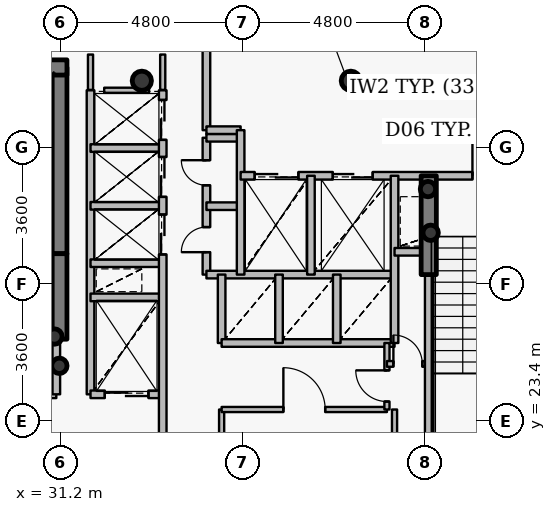
"""IFC4 building model, lengths in metres.
Left out: names, types, materials, properties, quantities, classifications, styles, units other than length and angle.
Written with IfcOpenShell. Run it as: python <this file> out.ifc"""

import sys

from ifc_helpers import new_model, si_unit, direction, frame, frame_2d, origin, origin_2d, place, context, subcontext, project, spatial, rectangle, hollow_circle, extrude, source, transform, mapped, element, fill, save


model = new_model("IFC4")
c1 = context("Model", 3, precision=1e-05, world=origin(), true_north=direction((0.0, 1.0)))
c2 = subcontext(c1, "Body", "Model", "MODEL_VIEW")
j1 = project(units=[si_unit("LENGTHUNIT", "METRE"), si_unit("PLANEANGLEUNIT", "RADIAN")], contexts=[c1])
p1 = place(None, origin())
s1 = spatial("IfcSite", under=j1, at=p1, CompositionType="ELEMENT")
p2 = place(p1, origin())
s2 = spatial("IfcBuilding", under=s1, at=p2, CompositionType="ELEMENT")
p3 = place(p2, frame((0.0, 0.0, 217.8)))
s3 = spatial("IfcBuildingStorey", under=s2, at=p3, CompositionType="ELEMENT", Elevation=217.8)
for number, where, z_axis, x_axis in (
    (1, (38.85, 32.35, 0.0), (0.0, 0.0, 1.0), (1.0, 0.0, 0.0)),
    (2, (33.35, 32.35, 0.0), (0.0, 0.0, 1.0), (1.0, 0.0, 0.0)),
):
    element("IfcColumn", number, at=place(p3, frame(where, z_axis=z_axis, x_axis=x_axis)), inside=s3, PredefinedType="COLUMN", context=c2, shape_type="SweptSolid", body=[
        extrude(hollow_circle(Radius=0.254, WallThickness=0.02, at=origin_2d()), origin(), (0.0, 0.0, 1.0), 3.75),
    ])
p4 = place(p3, frame((31.18, 27.8, 0.0), z_axis=(0.0, 0.0, 1.0), x_axis=(0.0, 1.0, 0.0)))
e3 = element("IfcWall", 3, at=p4, inside=s3, PredefinedType="SHEAR", context=c2, shape_type="SweptSolid", body=[
    extrude(rectangle(XDim=4.9, YDim=0.4, at=frame_2d((2.45, 0.0))), origin(), (0.0, 0.0, 1.0), 3.75),
])
p5 = place(p3, frame((27.28, 32.7, 0.0), z_axis=(0.0, 0.0, 1.0), x_axis=(1.0, 0.0, 0.0)))
e4 = element("IfcWall", 4, at=p5, inside=s3, PredefinedType="SHEAR", context=c2, shape_type="SweptSolid", body=[
    extrude(rectangle(XDim=4.1, YDim=0.4, at=frame_2d((2.05, 0.0))), origin(), (0.0, 0.0, 1.0), 3.75),
])
for number, where, z_axis, x_axis in (
    (5, (31.05, 25.62, 0.0), (0.0, 0.0, 1.0), (1.0, 0.0, 0.0)),
    (6, (31.18, 24.85, 0.0), (0.0, 0.0, 1.0), (1.0, 0.0, 0.0)),
    (7, (40.95, 28.35, 0.0), (0.0, 0.0, 1.0), (1.0, 0.0, 0.0)),
    (8, (40.88, 29.5, 0.0), (0.0, 0.0, 1.0), (1.0, 0.0, 0.0)),
):
    element("IfcColumn", number, at=place(p3, frame(where, z_axis=z_axis, x_axis=x_axis)), inside=s3, PredefinedType="COLUMN", context=c2, shape_type="SweptSolid", body=[
        extrude(hollow_circle(Radius=0.203, WallThickness=0.016, at=origin_2d()), origin(), (0.0, 0.0, 1.0), 3.75),
    ])
p6 = place(p3, frame((31.18, 25.55, 0.0), z_axis=(0.0, 0.0, 1.0), x_axis=(0.0, 1.0, 0.0)))
e9 = element("IfcWall", 9, at=p6, inside=s3, PredefinedType="SHEAR", context=c2, shape_type="SweptSolid", body=[
    extrude(rectangle(XDim=2.25, YDim=0.4, at=frame_2d((1.125, 0.0))), origin(), (0.0, 0.0, 1.0), 3.1),
])
p7 = place(p3, frame((40.9, 27.25, 0.0), z_axis=(0.0, 0.0, 1.0), x_axis=(0.0, 1.0, 0.0)))
e10 = element("IfcWall", 10, at=p7, inside=s3, PredefinedType="SHEAR", context=c2, shape_type="SweptSolid", body=[
    extrude(rectangle(XDim=2.6, YDim=0.4, at=frame_2d((1.3, 0.0))), origin(), (0.0, 0.0, 1.0), 3.1),
])
p8 = place(p3, frame((27.56, 24.1, 0.0), z_axis=(0.0, 0.0, 1.0), x_axis=(1.0, 0.0, 0.0)))
e11 = element("IfcWall", 11, at=p8, inside=s3, PredefinedType="PARTITIONING", context=c2, shape_type="SweptSolid", body=[
    extrude(rectangle(XDim=3.54, YDim=0.2, at=frame_2d((1.77, 0.0))), origin(), (0.0, 0.0, 1.0), 3.5),
])
p9 = place(p8, frame((1.17, 0.0, 0.0)))
e12 = element("IfcOpeningElement", 12, at=p9, cuts=e11, PredefinedType="OPENING", context=c2, shape_type="SweptSolid", body=[
    extrude(rectangle(XDim=1.2, YDim=2.15, at=origin_2d()), frame((0.6, 0.11, 1.075), z_axis=(0.0, -1.0, 0.0), x_axis=(1.0, 0.0, 0.0)), (0.0, 0.0, 1.0), 0.22),
])
p10 = place(p3, frame((31.1, 24.1, 0.0), z_axis=(0.0, 0.0, 1.0), x_axis=(0.0, 1.0, 0.0)))
e13 = element("IfcWall", 13, at=p10, inside=s3, PredefinedType="PARTITIONING", context=c2, shape_type="SweptSolid", body=[
    extrude(rectangle(XDim=1.44, YDim=0.2, at=frame_2d((0.72, 0.0))), origin(), (0.0, 0.0, 1.0), 3.5),
])
p11 = place(p3, frame((32.0, 24.1, 0.0), z_axis=(0.0, 0.0, 1.0), x_axis=(0.0, 1.0, 0.0)))
e14 = element("IfcWall", 14, at=p11, inside=s3, PredefinedType="PARTITIONING", context=c2, shape_type="SweptSolid", body=[
    extrude(rectangle(XDim=8.0, YDim=0.2, at=frame_2d((4.0, 0.0))), origin(), (0.0, 0.0, 1.0), 3.5),
])
p12 = place(p3, frame((32.0, 24.1, 0.0), z_axis=(0.0, 0.0, 1.0), x_axis=(1.0, 0.0, 0.0)))
e15 = element("IfcWall", 15, at=p12, inside=s3, PredefinedType="PARTITIONING", context=c2, shape_type="SweptSolid", body=[
    extrude(rectangle(XDim=1.9, YDim=0.2, at=frame_2d((0.95, 0.0))), origin(), (0.0, 0.0, 1.0), 3.085),
])
p13 = place(p12, frame((0.375, 0.0, 0.0)))
e16 = element("IfcOpeningElement", 16, at=p13, cuts=e15, PredefinedType="OPENING", context=c2, shape_type="SweptSolid", body=[
    extrude(rectangle(XDim=1.15, YDim=2.15, at=origin_2d()), frame((0.575, 0.11, 1.075), z_axis=(0.0, -1.0, 0.0), x_axis=(1.0, 0.0, 0.0)), (0.0, 0.0, 1.0), 0.22),
])
for number, where, z_axis, x_axis in (
    (17, (32.0, 26.65, 0.0), (0.0, 0.0, 1.0), (1.0, 0.0, 0.0)),
    (18, (32.0, 27.55, 0.0), (0.0, 0.0, 1.0), (1.0, 0.0, 0.0)),
    (19, (32.0, 29.06, 0.0), (0.0, 0.0, 1.0), (1.0, 0.0, 0.0)),
    (20, (32.0, 30.58, 0.0), (0.0, 0.0, 1.0), (1.0, 0.0, 0.0)),
):
    element("IfcWall", number, at=place(p3, frame(where, z_axis=z_axis, x_axis=x_axis)), inside=s3, PredefinedType="PARTITIONING", context=c2, shape_type="SweptSolid", body=[
        extrude(rectangle(XDim=1.9, YDim=0.2, at=frame_2d((0.95, 0.0))), origin(), (0.0, 0.0, 1.0), 3.085),
    ])
p14 = place(p3, frame((33.9, 20.7, 0.0), z_axis=(0.0, 0.0, 1.0), x_axis=(0.0, 1.0, 0.0)))
e21 = element("IfcWall", 21, at=p14, inside=s3, PredefinedType="PARTITIONING", context=c2, shape_type="SweptSolid", body=[
    extrude(rectangle(XDim=11.4, YDim=0.2, at=frame_2d((5.7, 0.0))), origin(), (0.0, 0.0, 1.0), 3.085),
])
p15 = place(p14, frame((7.08, 0.0, 0.0)))
e22 = element("IfcOpeningElement", 22, at=p15, cuts=e21, PredefinedType="OPENING", context=c2, shape_type="SweptSolid", body=[
    extrude(rectangle(XDim=1.05, YDim=2.15, at=origin_2d()), frame((0.525, 0.11, 1.075), z_axis=(0.0, -1.0, 0.0), x_axis=(1.0, 0.0, 0.0)), (0.0, 0.0, 1.0), 0.22),
])
p16 = place(p14, frame((8.595, 0.0, 0.0)))
e23 = element("IfcOpeningElement", 23, at=p16, cuts=e21, PredefinedType="OPENING", context=c2, shape_type="SweptSolid", body=[
    extrude(rectangle(XDim=1.05, YDim=2.15, at=origin_2d()), frame((0.525, 0.11, 1.075), z_axis=(0.0, -1.0, 0.0), x_axis=(1.0, 0.0, 0.0)), (0.0, 0.0, 1.0), 0.22),
])
p17 = place(p14, frame((10.095, 0.0, 0.0)))
e24 = element("IfcOpeningElement", 24, at=p17, cuts=e21, PredefinedType="OPENING", context=c2, shape_type="SweptSolid", body=[
    extrude(rectangle(XDim=1.05, YDim=2.15, at=origin_2d()), frame((0.525, 0.11, 1.075), z_axis=(0.0, -1.0, 0.0), x_axis=(1.0, 0.0, 0.0)), (0.0, 0.0, 1.0), 0.22),
])
p18 = place(p3, frame((35.05, 27.25, 0.0), z_axis=(0.0, 0.0, 1.0), x_axis=(0.0, 1.0, 0.0)))
e25 = element("IfcWall", 25, at=p18, inside=s3, PredefinedType="PARTITIONING", context=c2, shape_type="SweptSolid", body=[
    extrude(rectangle(XDim=3.6, YDim=0.2, at=frame_2d((1.8, 0.0))), origin(), (0.0, 0.0, 1.0), 3.5),
])
p19 = place(p18, frame((0.59, 0.0, 0.0)))
e26 = element("IfcOpeningElement", 26, at=p19, cuts=e25, PredefinedType="OPENING", context=c2, shape_type="SweptSolid", body=[
    extrude(rectangle(XDim=0.66, YDim=2.05, at=origin_2d()), frame((0.33, 0.11, 1.025), z_axis=(0.0, -1.0, 0.0), x_axis=(1.0, 0.0, 0.0)), (0.0, 0.0, 1.0), 0.22),
])
p20 = place(p18, frame((2.35, 0.0, 0.0)))
e27 = element("IfcOpeningElement", 27, at=p20, cuts=e25, PredefinedType="OPENING", context=c2, shape_type="SweptSolid", body=[
    extrude(rectangle(XDim=0.66, YDim=2.05, at=origin_2d()), frame((0.33, 0.11, 1.025), z_axis=(0.0, -1.0, 0.0), x_axis=(1.0, 0.0, 0.0)), (0.0, 0.0, 1.0), 0.22),
])
p21 = place(p3, frame((35.05, 27.25, 0.0), z_axis=(0.0, 0.0, 1.0), x_axis=(1.0, 0.0, 0.0)))
e28 = element("IfcWall", 28, at=p21, inside=s3, PredefinedType="PARTITIONING", context=c2, shape_type="SweptSolid", body=[
    extrude(rectangle(XDim=4.95, YDim=0.2, at=frame_2d((2.475, 0.0))), origin(), (0.0, 0.0, 1.0), 3.085),
])
for number, where, z_axis, x_axis in (
    (29, (35.05, 29.05, 0.0), (0.0, 0.0, 1.0), (1.0, 0.0, 0.0)),
    (30, (35.05, 30.85, 0.0), (0.0, 0.0, 1.0), (1.0, 0.0, 0.0)),
):
    element("IfcWall", number, at=place(p3, frame(where, z_axis=z_axis, x_axis=x_axis)), inside=s3, PredefinedType="PARTITIONING", context=c2, shape_type="SweptSolid", body=[
        extrude(rectangle(XDim=0.9, YDim=0.2, at=frame_2d((0.45, 0.0))), origin(), (0.0, 0.0, 1.0), 3.5),
    ])
p22 = place(p3, frame((35.05, 31.05, 0.0), z_axis=(0.0, 0.0, 1.0), x_axis=(0.0, 1.0, 0.0)))
e31 = element("IfcWall", 31, at=p22, inside=s3, PredefinedType="PARTITIONING", context=c2, shape_type="SweptSolid", body=[
    extrude(rectangle(XDim=2.25, YDim=0.2, at=frame_2d((1.125, 0.0))), origin(), (0.0, 0.0, 1.0), 3.085),
])
p23 = place(p3, frame((35.05, 31.05, 0.0), z_axis=(0.0, 0.0, 1.0), x_axis=(1.0, 0.0, 0.0)))
e32 = element("IfcWall", 32, at=p23, inside=s3, PredefinedType="PARTITIONING", context=c2, shape_type="SweptSolid", body=[
    extrude(rectangle(XDim=0.9, YDim=0.2, at=frame_2d((0.45, 0.0))), origin(), (0.0, 0.0, 1.0), 3.5),
])
p24 = place(p3, frame((35.45, 20.7, 0.0), z_axis=(0.0, 0.0, 1.0), x_axis=(0.0, 1.0, 0.0)))
e33 = element("IfcWall", 33, at=p24, inside=s3, PredefinedType="PARTITIONING", context=c2, shape_type="SweptSolid", body=[
    extrude(rectangle(XDim=3.0, YDim=0.135, at=frame_2d((1.5, 0.0))), origin(), (0.0, 0.0, 1.0), 3.085),
])
p25 = place(p3, frame((35.45, 23.7, 0.0), z_axis=(0.0, 0.0, 1.0), x_axis=(1.0, 0.0, 0.0)))
e34 = element("IfcWall", 34, at=p25, inside=s3, PredefinedType="PARTITIONING", context=c2, shape_type="SweptSolid", body=[
    extrude(rectangle(XDim=4.35, YDim=0.135, at=frame_2d((2.175, 0.0))), origin(), (0.0, 0.0, 1.0), 3.085),
])
p26 = place(p25, frame((1.625, 0.0, 0.0)))
e35 = element("IfcOpeningElement", 35, at=p26, cuts=e34, PredefinedType="OPENING", context=c2, shape_type="SweptSolid", body=[
    extrude(rectangle(XDim=1.1, YDim=2.15, at=origin_2d()), frame((0.55, 0.078, 1.075), z_axis=(0.0, -1.0, 0.0), x_axis=(1.0, 0.0, 0.0)), (0.0, 0.0, 1.0), 0.155),
])
p27 = place(p3, frame((35.45, 25.45, 0.0), z_axis=(0.0, 0.0, 1.0), x_axis=(0.0, 1.0, 0.0)))
e36 = element("IfcWall", 36, at=p27, inside=s3, PredefinedType="PARTITIONING", context=c2, shape_type="SweptSolid", body=[
    extrude(rectangle(XDim=1.8, YDim=0.2, at=frame_2d((0.9, 0.0))), origin(), (0.0, 0.0, 1.0), 3.5),
])
p28 = place(p3, frame((35.45, 25.45, 0.0), z_axis=(0.0, 0.0, 1.0), x_axis=(1.0, 0.0, 0.0)))
e37 = element("IfcWall", 37, at=p28, inside=s3, PredefinedType="PARTITIONING", context=c2, shape_type="SweptSolid", body=[
    extrude(rectangle(XDim=4.55, YDim=0.2, at=frame_2d((2.275, 0.0))), origin(), (0.0, 0.0, 1.0), 3.085),
])
p29 = place(p3, frame((35.95, 27.25, 0.0), z_axis=(0.0, 0.0, 1.0), x_axis=(0.0, 1.0, 0.0)))
e38 = element("IfcWall", 38, at=p29, inside=s3, PredefinedType="PARTITIONING", context=c2, shape_type="SweptSolid", body=[
    extrude(rectangle(XDim=3.8, YDim=0.2, at=frame_2d((1.9, 0.0))), origin(), (0.0, 0.0, 1.0), 3.5),
])
p30 = place(p3, frame((35.95, 29.85, 0.0), z_axis=(0.0, 0.0, 1.0), x_axis=(1.0, 0.0, 0.0)))
e39 = element("IfcWall", 39, at=p30, inside=s3, PredefinedType="PARTITIONING", context=c2, shape_type="SweptSolid", body=[
    extrude(rectangle(XDim=8.49, YDim=0.2, at=frame_2d((4.245, 0.0))), origin(), (0.0, 0.0, 1.0), 3.085),
])
p31 = place(p30, frame((6.1, 0.0, 0.0)))
e40 = element("IfcOpeningElement", 40, at=p31, cuts=e39, PredefinedType="OPENING", context=c2, shape_type="SweptSolid", body=[
    extrude(rectangle(XDim=1.2, YDim=2.15, at=origin_2d()), frame((0.6, 0.11, 1.075), z_axis=(0.0, -1.0, 0.0), x_axis=(1.0, 0.0, 0.0)), (0.0, 0.0, 1.0), 0.22),
])
p32 = place(p30, frame((0.37, 0.0, 0.0)))
e41 = element("IfcOpeningElement", 41, at=p32, cuts=e39, PredefinedType="OPENING", context=c2, shape_type="SweptSolid", body=[
    extrude(rectangle(XDim=1.15, YDim=2.15, at=origin_2d()), frame((0.575, 0.11, 1.075), z_axis=(0.0, -1.0, 0.0), x_axis=(1.0, 0.0, 0.0)), (0.0, 0.0, 1.0), 0.22),
])
p33 = place(p30, frame((2.425, 0.0, 0.0)))
e42 = element("IfcOpeningElement", 42, at=p33, cuts=e39, PredefinedType="OPENING", context=c2, shape_type="SweptSolid", body=[
    extrude(rectangle(XDim=1.05, YDim=2.15, at=origin_2d()), frame((0.525, 0.11, 1.075), z_axis=(0.0, -1.0, 0.0), x_axis=(1.0, 0.0, 0.0)), (0.0, 0.0, 1.0), 0.22),
])
p34 = place(p3, frame((36.96, 25.45, 0.0), z_axis=(0.0, 0.0, 1.0), x_axis=(0.0, 1.0, 0.0)))
e43 = element("IfcWall", 43, at=p34, inside=s3, PredefinedType="PARTITIONING", context=c2, shape_type="SweptSolid", body=[
    extrude(rectangle(XDim=1.8, YDim=0.2, at=frame_2d((0.9, 0.0))), origin(), (0.0, 0.0, 1.0), 3.5),
])
p35 = place(p3, frame((37.8, 27.25, 0.0), z_axis=(0.0, 0.0, 1.0), x_axis=(0.0, 1.0, 0.0)))
e44 = element("IfcWall", 44, at=p35, inside=s3, PredefinedType="PARTITIONING", context=c2, shape_type="SweptSolid", body=[
    extrude(rectangle(XDim=2.6, YDim=0.2, at=frame_2d((1.3, 0.0))), origin(), (0.0, 0.0, 1.0), 3.5),
])
p36 = place(p3, frame((38.48, 25.45, 0.0), z_axis=(0.0, 0.0, 1.0), x_axis=(0.0, 1.0, 0.0)))
e45 = element("IfcWall", 45, at=p36, inside=s3, PredefinedType="PARTITIONING", context=c2, shape_type="SweptSolid", body=[
    extrude(rectangle(XDim=1.8, YDim=0.2, at=frame_2d((0.9, 0.0))), origin(), (0.0, 0.0, 1.0), 3.5),
])
p37 = place(p3, frame((39.8, 23.7, 0.0), z_axis=(0.0, 0.0, 1.0), x_axis=(0.0, 1.0, 0.0)))
e46 = element("IfcWall", 46, at=p37, inside=s3, PredefinedType="PARTITIONING", context=c2, shape_type="SweptSolid", body=[
    extrude(rectangle(XDim=1.75, YDim=0.135, at=frame_2d((0.875, 0.0))), origin(), (0.0, 0.0, 1.0), 3.5),
])
p38 = place(p37, frame((0.21, 0.0, 0.0)))
e47 = element("IfcOpeningElement", 47, at=p38, cuts=e46, PredefinedType="OPENING", context=c2, shape_type="SweptSolid", body=[
    extrude(rectangle(XDim=0.82, YDim=2.1, at=origin_2d()), frame((0.41, 0.078, 1.05), z_axis=(0.0, -1.0, 0.0), x_axis=(1.0, 0.0, 0.0)), (0.0, 0.0, 1.0), 0.155),
])
p39 = place(p3, frame((39.8, 24.9, 0.0), z_axis=(0.0, 0.0, 1.0), x_axis=(1.0, 0.0, 0.0)))
e48 = element("IfcWall", 48, at=p39, inside=s3, PredefinedType="PARTITIONING", context=c2, shape_type="SweptSolid", body=[
    extrude(rectangle(XDim=1.1, YDim=0.15, at=frame_2d((0.55, 0.0))), origin(), (0.0, 0.0, 1.0), 3.5),
])
p40 = place(p39, frame((0.17, 0.0, 0.0)))
e49 = element("IfcOpeningElement", 49, at=p40, cuts=e48, PredefinedType="OPENING", context=c2, shape_type="SweptSolid", body=[
    extrude(rectangle(XDim=0.76, YDim=2.1, at=origin_2d()), frame((0.38, 0.085, 1.05), z_axis=(0.0, -1.0, 0.0), x_axis=(1.0, 0.0, 0.0)), (0.0, 0.0, 1.0), 0.17),
])
p41 = place(p3, frame((40.0, 25.45, 0.0), z_axis=(0.0, 0.0, 1.0), x_axis=(0.0, 1.0, 0.0)))
e50 = element("IfcWall", 50, at=p41, inside=s3, PredefinedType="PARTITIONING", context=c2, shape_type="SweptSolid", body=[
    extrude(rectangle(XDim=4.4, YDim=0.2, at=frame_2d((2.2, 0.0))), origin(), (0.0, 0.0, 1.0), 3.5),
])
p42 = place(p3, frame((40.0, 27.85, 0.0), z_axis=(0.0, 0.0, 1.0), x_axis=(1.0, 0.0, 0.0)))
e51 = element("IfcWall", 51, at=p42, inside=s3, PredefinedType="PARTITIONING", context=c2, shape_type="SweptSolid", body=[
    extrude(rectangle(XDim=0.9, YDim=0.2, at=frame_2d((0.45, 0.0))), origin(), (0.0, 0.0, 1.0), 3.5),
])
p43 = place(p3, frame((40.9, 21.33, 0.0), z_axis=(0.0, 0.0, 1.0), x_axis=(0.0, 1.0, 0.0)))
e52 = element("IfcWall", 52, at=p43, inside=s3, PredefinedType="PARTITIONING", context=c2, shape_type="SweptSolid", body=[
    extrude(rectangle(XDim=5.91, YDim=0.2, at=frame_2d((2.955, 0.0))), origin(), (0.0, 0.0, 1.0), 3.035),
])
p44 = place(p3, frame((32.36, 32.1, 0.0), z_axis=(0.0, 0.0, 1.0), x_axis=(1.0, 0.0, 0.0)))
e53 = element("IfcWall", 53, at=p44, inside=s3, PredefinedType="PARTITIONING", context=c2, shape_type="SweptSolid", body=[
    extrude(rectangle(XDim=1.18, YDim=0.135, at=frame_2d((0.59, 0.0))), origin(), (0.0, 0.0, 1.0), 3.085),
])
p45 = place(p3, frame((40.0, 23.7, 0.0), z_axis=(0.0, 0.0, 1.0), x_axis=(0.0, -1.0, 0.0)))
e54 = element("IfcWall", 54, at=p45, inside=s3, PredefinedType="PARTITIONING", context=c2, shape_type="SweptSolid", body=[
    extrude(rectangle(XDim=2.74, YDim=0.135, at=frame_2d((1.37, 0.0))), origin(), (0.0, 0.0, 1.0), 3.035),
])
p46 = place(p3, frame((32.0, 33.04, 0.0), z_axis=(0.0, 0.0, 1.0), x_axis=(0.0, -1.0, 0.0)))
e55 = element("IfcWall", 55, at=p46, inside=s3, PredefinedType="PARTITIONING", context=c2, shape_type="SweptSolid", body=[
    extrude(rectangle(XDim=0.93, YDim=0.135, at=frame_2d((0.465, 0.0))), origin(), (0.0, 0.0, 1.0), 3.035),
])
p47 = place(p3, frame((33.9, 32.11, 0.0), z_axis=(0.0, 0.0, 1.0), x_axis=(0.0, 1.0, 0.0)))
e56 = element("IfcWall", 56, at=p47, inside=s3, PredefinedType="PARTITIONING", context=c2, shape_type="SweptSolid", body=[
    extrude(rectangle(XDim=0.93, YDim=0.135, at=frame_2d((0.465, 0.0))), origin(), (0.0, 0.0, 1.0), 3.085),
])
m1 = source(origin(), c2, "Body", "SweptSolid", [
    extrude(rectangle(XDim=1.2, YDim=2.15, at=origin_2d()), frame((0.6, 0.025, 1.075), z_axis=(0.0, -1.0, 0.0), x_axis=(1.0, 0.0, 0.0)), (0.0, 0.0, 1.0), 0.05),
])
p48 = place(p31, origin())
e57 = element("IfcDoor", 57, at=p48, inside=s3, OperationType="SINGLE_SWING_LEFT", PredefinedType="DOOR", context=c2, shape_type="MappedRepresentation", body=[
    mapped(m1, transform((0.0, 0.0, 0.0), x_axis=(1.0, 0.0, 0.0), y_axis=(0.0, 1.0, 0.0), z_axis=(0.0, 0.0, 1.0), scale=1.0)),
])
fill(e40, e57)
m2 = source(origin(), c2, "Body", "SweptSolid", [
    extrude(rectangle(XDim=1.15, YDim=2.15, at=origin_2d()), frame((0.575, 0.025, 1.075), z_axis=(0.0, -1.0, 0.0), x_axis=(1.0, 0.0, 0.0)), (0.0, 0.0, 1.0), 0.05),
])
p49 = place(p32, origin())
e58 = element("IfcDoor", 58, at=p49, inside=s3, OperationType="DOUBLE_DOOR_SLIDING", PredefinedType="USERDEFINED", context=c2, shape_type="MappedRepresentation", body=[
    mapped(m2, transform((0.0, 0.0, 0.0), x_axis=(1.0, 0.0, 0.0), y_axis=(0.0, 1.0, 0.0), z_axis=(0.0, 0.0, 1.0), scale=1.0)),
])
fill(e41, e58)
p50 = place(p13, origin())
e59 = element("IfcDoor", 59, at=p50, inside=s3, OperationType="DOUBLE_DOOR_SLIDING", PredefinedType="USERDEFINED", context=c2, shape_type="MappedRepresentation", body=[
    mapped(m2, transform((0.0, 0.0, 0.0), x_axis=(1.0, 0.0, 0.0), y_axis=(0.0, 1.0, 0.0), z_axis=(0.0, 0.0, 1.0), scale=1.0)),
])
fill(e16, e59)
m3 = source(origin(), c2, "Body", "SweptSolid", [
    extrude(rectangle(XDim=1.05, YDim=2.15, at=origin_2d()), frame((0.525, 0.025, 1.075), z_axis=(0.0, -1.0, 0.0), x_axis=(1.0, 0.0, 0.0)), (0.0, 0.0, 1.0), 0.05),
])
p51 = place(p33, origin())
e60 = element("IfcDoor", 60, at=p51, inside=s3, OperationType="DOUBLE_DOOR_SLIDING", PredefinedType="USERDEFINED", context=c2, shape_type="MappedRepresentation", body=[
    mapped(m3, transform((0.0, 0.0, 0.0), x_axis=(1.0, 0.0, 0.0), y_axis=(0.0, 1.0, 0.0), z_axis=(0.0, 0.0, 1.0), scale=1.0)),
])
fill(e42, e60)
p52 = place(p15, origin())
e61 = element("IfcDoor", 61, at=p52, inside=s3, OperationType="DOUBLE_DOOR_SLIDING", PredefinedType="USERDEFINED", context=c2, shape_type="MappedRepresentation", body=[
    mapped(m3, transform((0.0, 0.0, 0.0), x_axis=(1.0, 0.0, 0.0), y_axis=(0.0, 1.0, 0.0), z_axis=(0.0, 0.0, 1.0), scale=1.0)),
])
fill(e22, e61)
p53 = place(p16, origin())
e62 = element("IfcDoor", 62, at=p53, inside=s3, OperationType="DOUBLE_DOOR_SLIDING", PredefinedType="USERDEFINED", context=c2, shape_type="MappedRepresentation", body=[
    mapped(m3, transform((0.0, 0.0, 0.0), x_axis=(1.0, 0.0, 0.0), y_axis=(0.0, 1.0, 0.0), z_axis=(0.0, 0.0, 1.0), scale=1.0)),
])
fill(e23, e62)
p54 = place(p17, origin())
e63 = element("IfcDoor", 63, at=p54, inside=s3, OperationType="DOUBLE_DOOR_SLIDING", PredefinedType="USERDEFINED", context=c2, shape_type="MappedRepresentation", body=[
    mapped(m3, transform((0.0, 0.0, 0.0), x_axis=(1.0, 0.0, 0.0), y_axis=(0.0, 1.0, 0.0), z_axis=(0.0, 0.0, 1.0), scale=1.0)),
])
fill(e24, e63)
m4 = source(origin(), c2, "Body", "SweptSolid", [
    extrude(rectangle(XDim=0.66, YDim=2.05, at=origin_2d()), frame((0.33, 0.025, 1.025), z_axis=(0.0, -1.0, 0.0), x_axis=(1.0, 0.0, 0.0)), (0.0, 0.0, 1.0), 0.05),
])
p55 = place(p19, origin())
e64 = element("IfcDoor", 64, at=p55, inside=s3, OperationType="SINGLE_SWING_LEFT", PredefinedType="USERDEFINED", context=c2, shape_type="MappedRepresentation", body=[
    mapped(m4, transform((0.0, 0.0, 0.0), x_axis=(1.0, 0.0, 0.0), y_axis=(0.0, 1.0, 0.0), z_axis=(0.0, 0.0, 1.0), scale=1.0)),
])
fill(e26, e64)
p56 = place(p20, origin())
e65 = element("IfcDoor", 65, at=p56, inside=s3, OperationType="SINGLE_SWING_RIGHT", PredefinedType="USERDEFINED", context=c2, shape_type="MappedRepresentation", body=[
    mapped(m4, transform((0.0, 0.0, 0.0), x_axis=(1.0, 0.0, 0.0), y_axis=(0.0, 1.0, 0.0), z_axis=(0.0, 0.0, 1.0), scale=1.0)),
])
fill(e27, e65)
m5 = source(origin(), c2, "Body", "SweptSolid", [
    extrude(rectangle(XDim=1.1, YDim=2.15, at=origin_2d()), frame((0.55, 0.025, 1.075), z_axis=(0.0, -1.0, 0.0), x_axis=(1.0, 0.0, 0.0)), (0.0, 0.0, 1.0), 0.05),
])
p57 = place(p26, origin())
e66 = element("IfcDoor", 66, at=p57, inside=s3, OperationType="SINGLE_SWING_LEFT", PredefinedType="DOOR", context=c2, shape_type="MappedRepresentation", body=[
    mapped(m5, transform((0.0, 0.0, 0.0), x_axis=(1.0, 0.0, 0.0), y_axis=(0.0, 1.0, 0.0), z_axis=(0.0, 0.0, 1.0), scale=1.0)),
])
fill(e35, e66)
m6 = source(origin(), c2, "Body", "SweptSolid", [
    extrude(rectangle(XDim=0.82, YDim=2.1, at=origin_2d()), frame((0.41, 0.025, 1.05), z_axis=(0.0, -1.0, 0.0), x_axis=(1.0, 0.0, 0.0)), (0.0, 0.0, 1.0), 0.05),
])
p58 = place(p38, origin())
e67 = element("IfcDoor", 67, at=p58, inside=s3, OperationType="SINGLE_SWING_RIGHT", PredefinedType="DOOR", context=c2, shape_type="MappedRepresentation", body=[
    mapped(m6, transform((0.0, 0.0, 0.0), x_axis=(1.0, 0.0, 0.0), y_axis=(0.0, 1.0, 0.0), z_axis=(0.0, 0.0, 1.0), scale=1.0)),
])
fill(e47, e67)
m7 = source(origin(), c2, "Body", "SweptSolid", [
    extrude(rectangle(XDim=0.76, YDim=2.1, at=origin_2d()), frame((0.38, 0.025, 1.05), z_axis=(0.0, -1.0, 0.0), x_axis=(1.0, 0.0, 0.0)), (0.0, 0.0, 1.0), 0.05),
])
p59 = place(p40, origin())
e68 = element("IfcDoor", 68, at=p59, inside=s3, OperationType="SINGLE_SWING_LEFT", PredefinedType="DOOR", context=c2, shape_type="MappedRepresentation", body=[
    mapped(m7, transform((0.0, 0.0, 0.0), x_axis=(1.0, 0.0, 0.0), y_axis=(0.0, 1.0, 0.0), z_axis=(0.0, 0.0, 1.0), scale=1.0)),
])
fill(e49, e68)
save(model, sys.argv[1])
